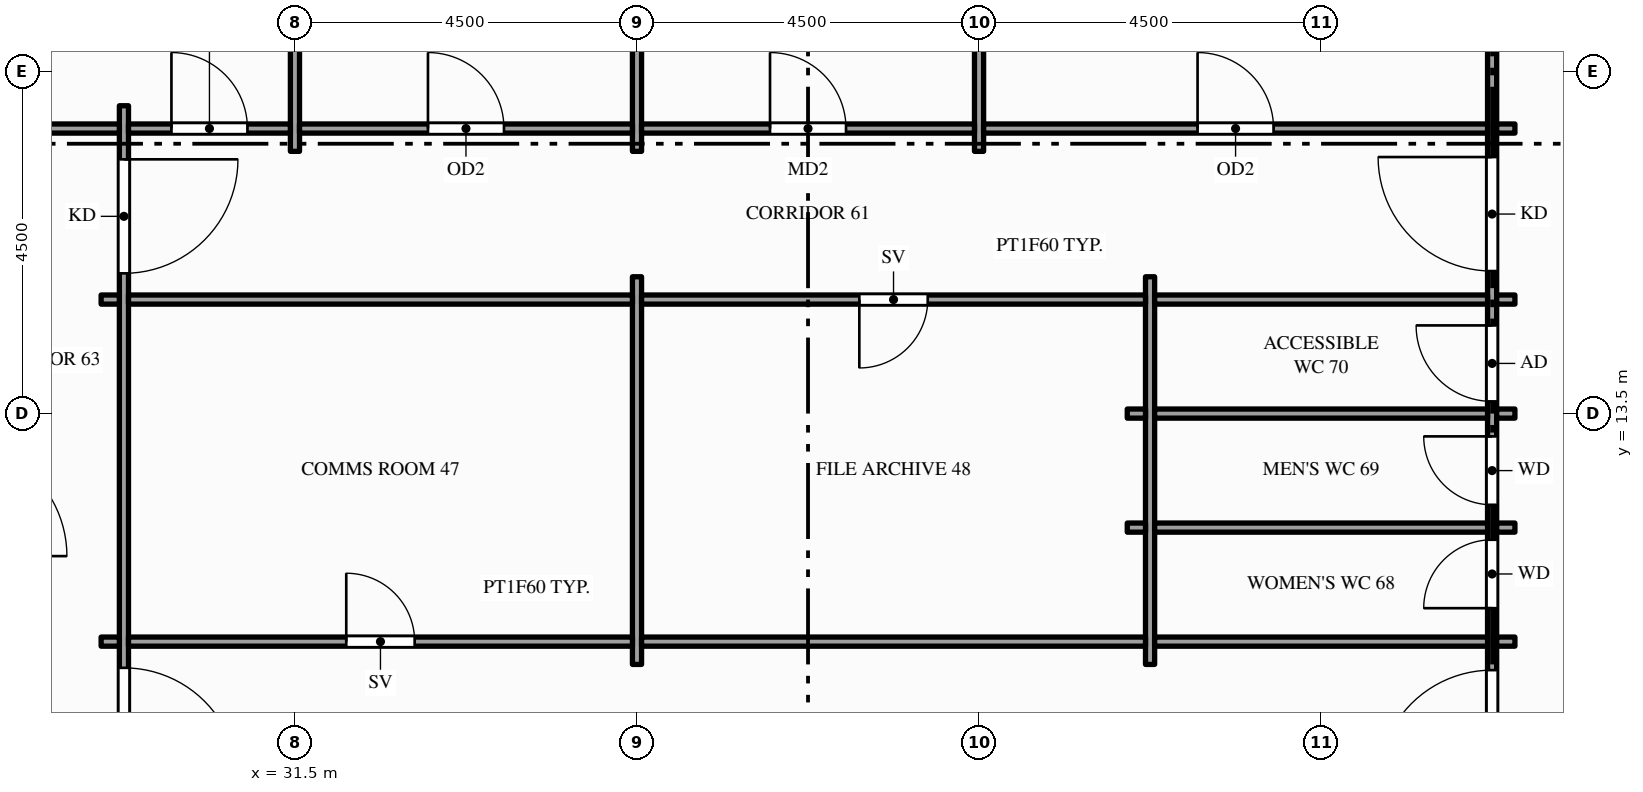
"""IFC4 building model, lengths in metres.
Left out: names, types, materials, properties, quantities, classifications, styles, units other than length and angle.
Written with IfcOpenShell. Run it as: python <this file> out.ifc"""

import sys

from ifc_helpers import new_model, si_unit, direction, frame, frame_2d, origin, place, context, subcontext, project, spatial, rectangle, extrude, element, fill, save


model = new_model("IFC4")
c1 = context("Model", 3, precision=1e-05, world=origin(), true_north=direction((0.0, 1.0)))
c2 = subcontext(c1, "Body", "Model", "MODEL_VIEW")
j1 = project(units=[si_unit("LENGTHUNIT", "METRE"), si_unit("PLANEANGLEUNIT", "RADIAN")], contexts=[c1])
p1 = place(None, origin())
s1 = spatial("IfcSite", under=j1, at=p1, CompositionType="ELEMENT")
p2 = place(p1, origin())
s2 = spatial("IfcBuilding", under=s1, at=p2, CompositionType="ELEMENT")
p3 = place(p2, frame((0.0, 0.0, 171.0)))
s3 = spatial("IfcBuildingStorey", under=s2, at=p3, CompositionType="ELEMENT", Elevation=171.0)
p4 = place(p3, frame((29.25, 7.95, 0.0), z_axis=(0.0, 0.0, 1.0), x_axis=(0.0, 1.0, 0.0)))
e1 = element("IfcWall", 1, at=p4, inside=s3, PredefinedType="PARTITIONING", context=c2, shape_type="SweptSolid", body=[
    extrude(rectangle(XDim=9.6, YDim=0.12, at=frame_2d((4.8, 0.0))), origin(), (0.0, 0.0, 1.0), 2.87),
])
p5 = place(p4, frame((0.705, 0.0, 0.0)))
e2 = element("IfcOpeningElement", 2, at=p5, cuts=e1, PredefinedType="OPENING", context=c2, shape_type="SweptSolid", body=[
    extrude(rectangle(XDim=1.5, YDim=2.1, at=frame_2d((0.75, 1.05))), frame((0.0, 0.07, 0.0), z_axis=(0.0, -1.0, 0.0), x_axis=(1.0, 0.0, 0.0)), (0.0, 0.0, 1.0), 0.14),
])
p6 = place(p4, frame((7.395, 0.0, 0.0)))
e3 = element("IfcOpeningElement", 3, at=p6, cuts=e1, PredefinedType="OPENING", context=c2, shape_type="SweptSolid", body=[
    extrude(rectangle(XDim=1.5, YDim=2.1, at=frame_2d((0.75, 1.05))), frame((0.0, 0.07, 0.0), z_axis=(0.0, -1.0, 0.0), x_axis=(1.0, 0.0, 0.0)), (0.0, 0.0, 1.0), 0.14),
])
p7 = place(p3, frame((31.5, 16.95, 0.0), z_axis=(0.0, 0.0, 1.0), x_axis=(0.0, 1.0, 0.0)))
e4 = element("IfcWall", 4, at=p7, inside=s3, PredefinedType="PARTITIONING", context=c2, shape_type="SweptSolid", body=[
    extrude(rectangle(XDim=6.9, YDim=0.12, at=frame_2d((3.45, 0.0))), origin(), (0.0, 0.0, 1.0), 2.87),
])
p8 = place(p3, frame((36.0, 10.2, 0.0), z_axis=(0.0, 0.0, 1.0), x_axis=(0.0, 1.0, 0.0)))
e5 = element("IfcWall", 5, at=p8, inside=s3, PredefinedType="PARTITIONING", context=c2, shape_type="SweptSolid", body=[
    extrude(rectangle(XDim=5.1, YDim=0.12, at=frame_2d((2.55, 0.0))), origin(), (0.0, 0.0, 1.0), 2.87),
])
for number, where, z_axis, x_axis in (
    (6, (36.0, 16.95, 0.0), (0.0, 0.0, 1.0), (0.0, 1.0, 0.0)),
    (7, (40.5, 16.95, 0.0), (0.0, 0.0, 1.0), (0.0, 1.0, 0.0)),
):
    element("IfcWall", number, at=place(p3, frame(where, z_axis=z_axis, x_axis=x_axis)), inside=s3, PredefinedType="PARTITIONING", context=c2, shape_type="SweptSolid", body=[
        extrude(rectangle(XDim=6.9, YDim=0.12, at=frame_2d((3.45, 0.0))), origin(), (0.0, 0.0, 1.0), 2.87),
    ])
p9 = place(p3, frame((42.75, 10.2, 0.0), z_axis=(0.0, 0.0, 1.0), x_axis=(0.0, 1.0, 0.0)))
e8 = element("IfcWall", 8, at=p9, inside=s3, PredefinedType="PARTITIONING", context=c2, shape_type="SweptSolid", body=[
    extrude(rectangle(XDim=5.1, YDim=0.12, at=frame_2d((2.55, 0.0))), origin(), (0.0, 0.0, 1.0), 2.87),
])
p10 = place(p3, frame((47.25, 1.65, 0.0), z_axis=(0.0, 0.0, 1.0), x_axis=(0.0, 1.0, 0.0)))
e9 = element("IfcWall", 9, at=p10, inside=s3, PredefinedType="PARTITIONING", context=c2, shape_type="SweptSolid", body=[
    extrude(rectangle(XDim=22.2, YDim=0.12, at=frame_2d((11.1, 0.0))), origin(), (0.0, 0.0, 1.0), 2.87),
])
p11 = place(p10, frame((6.975, 0.0, 0.0)))
e10 = element("IfcOpeningElement", 10, at=p11, cuts=e9, PredefinedType="OPENING", context=c2, shape_type="SweptSolid", body=[
    extrude(rectangle(XDim=1.5, YDim=2.1, at=frame_2d((0.75, 1.05))), frame((0.0, 0.07, 0.0), z_axis=(0.0, -1.0, 0.0), x_axis=(1.0, 0.0, 0.0)), (0.0, 0.0, 1.0), 0.14),
])
p12 = place(p10, frame((13.725, 0.0, 0.0)))
e11 = element("IfcOpeningElement", 11, at=p12, cuts=e9, PredefinedType="OPENING", context=c2, shape_type="SweptSolid", body=[
    extrude(rectangle(XDim=1.5, YDim=2.1, at=frame_2d((0.75, 1.05))), frame((0.0, 0.07, 0.0), z_axis=(0.0, -1.0, 0.0), x_axis=(1.0, 0.0, 0.0)), (0.0, 0.0, 1.0), 0.14),
])
p13 = place(p10, frame((9.29, 0.0, 0.0)))
e12 = element("IfcOpeningElement", 12, at=p13, cuts=e9, PredefinedType="OPENING", context=c2, shape_type="SweptSolid", body=[
    extrude(rectangle(XDim=0.9, YDim=2.1, at=frame_2d((0.45, 1.05))), frame((0.0, 0.07, 0.0), z_axis=(0.0, -1.0, 0.0), x_axis=(1.0, 0.0, 0.0)), (0.0, 0.0, 1.0), 0.14),
])
p14 = place(p10, frame((10.65, 0.0, 0.0)))
e13 = element("IfcOpeningElement", 13, at=p14, cuts=e9, PredefinedType="OPENING", context=c2, shape_type="SweptSolid", body=[
    extrude(rectangle(XDim=0.9, YDim=2.1, at=frame_2d((0.45, 1.05))), frame((0.0, 0.07, 0.0), z_axis=(0.0, -1.0, 0.0), x_axis=(1.0, 0.0, 0.0)), (0.0, 0.0, 1.0), 0.14),
])
p15 = place(p10, frame((12.01, 0.0, 0.0)))
e14 = element("IfcOpeningElement", 14, at=p15, cuts=e9, PredefinedType="OPENING", context=c2, shape_type="SweptSolid", body=[
    extrude(rectangle(XDim=1.0, YDim=2.1, at=frame_2d((0.5, 1.05))), frame((0.0, 0.07, 0.0), z_axis=(0.0, -1.0, 0.0), x_axis=(1.0, 0.0, 0.0)), (0.0, 0.0, 1.0), 0.14),
])
p16 = place(p3, frame((28.95, 10.5, 0.0), z_axis=(0.0, 0.0, 1.0), x_axis=(1.0, 0.0, 0.0)))
e15 = element("IfcWall", 15, at=p16, inside=s3, PredefinedType="PARTITIONING", context=c2, shape_type="SweptSolid", body=[
    extrude(rectangle(XDim=0.24, YDim=0.12, at=frame_2d((0.12, 0.0))), origin(), (0.0, 0.0, 1.0), 2.87),
])
p17 = place(p3, frame((29.31, 10.5, 0.0), z_axis=(0.0, 0.0, 1.0), x_axis=(1.0, 0.0, 0.0)))
e16 = element("IfcWall", 16, at=p17, inside=s3, PredefinedType="PARTITIONING", context=c2, shape_type="SweptSolid", body=[
    extrude(rectangle(XDim=6.63, YDim=0.12, at=frame_2d((3.315, 0.0))), origin(), (0.0, 0.0, 1.0), 2.87),
])
p18 = place(p17, frame((2.865, 0.0, 0.0)))
e17 = element("IfcOpeningElement", 17, at=p18, cuts=e16, PredefinedType="OPENING", context=c2, shape_type="SweptSolid", body=[
    extrude(rectangle(XDim=0.9, YDim=2.1, at=frame_2d((0.45, 1.05))), frame((0.0, 0.07, 0.0), z_axis=(0.0, -1.0, 0.0), x_axis=(1.0, 0.0, 0.0)), (0.0, 0.0, 1.0), 0.14),
])
p19 = place(p3, frame((36.06, 10.5, 0.0), z_axis=(0.0, 0.0, 1.0), x_axis=(1.0, 0.0, 0.0)))
e18 = element("IfcWall", 18, at=p19, inside=s3, PredefinedType="PARTITIONING", context=c2, shape_type="SweptSolid", body=[
    extrude(rectangle(XDim=6.63, YDim=0.12, at=frame_2d((3.315, 0.0))), origin(), (0.0, 0.0, 1.0), 2.87),
])
p20 = place(p3, frame((42.81, 10.5, 0.0), z_axis=(0.0, 0.0, 1.0), x_axis=(1.0, 0.0, 0.0)))
e19 = element("IfcWall", 19, at=p20, inside=s3, PredefinedType="PARTITIONING", context=c2, shape_type="SweptSolid", body=[
    extrude(rectangle(XDim=4.38, YDim=0.12, at=frame_2d((2.19, 0.0))), origin(), (0.0, 0.0, 1.0), 2.87),
])
for number, where, z_axis, x_axis in (
    (20, (47.31, 10.5, 0.0), (0.0, 0.0, 1.0), (1.0, 0.0, 0.0)),
    (21, (42.45, 12.0, 0.0), (0.0, 0.0, 1.0), (1.0, 0.0, 0.0)),
):
    element("IfcWall", number, at=place(p3, frame(where, z_axis=z_axis, x_axis=x_axis)), inside=s3, PredefinedType="PARTITIONING", context=c2, shape_type="SweptSolid", body=[
        extrude(rectangle(XDim=0.24, YDim=0.12, at=frame_2d((0.12, 0.0))), origin(), (0.0, 0.0, 1.0), 2.87),
    ])
p21 = place(p3, frame((42.81, 12.0, 0.0), z_axis=(0.0, 0.0, 1.0), x_axis=(1.0, 0.0, 0.0)))
e22 = element("IfcWall", 22, at=p21, inside=s3, PredefinedType="PARTITIONING", context=c2, shape_type="SweptSolid", body=[
    extrude(rectangle(XDim=4.38, YDim=0.12, at=frame_2d((2.19, 0.0))), origin(), (0.0, 0.0, 1.0), 2.87),
])
for number, where, z_axis, x_axis in (
    (23, (47.31, 12.0, 0.0), (0.0, 0.0, 1.0), (1.0, 0.0, 0.0)),
    (24, (42.45, 13.5, 0.0), (0.0, 0.0, 1.0), (1.0, 0.0, 0.0)),
):
    element("IfcWall", number, at=place(p3, frame(where, z_axis=z_axis, x_axis=x_axis)), inside=s3, PredefinedType="PARTITIONING", context=c2, shape_type="SweptSolid", body=[
        extrude(rectangle(XDim=0.24, YDim=0.12, at=frame_2d((0.12, 0.0))), origin(), (0.0, 0.0, 1.0), 2.87),
    ])
p22 = place(p3, frame((42.81, 13.5, 0.0), z_axis=(0.0, 0.0, 1.0), x_axis=(1.0, 0.0, 0.0)))
e25 = element("IfcWall", 25, at=p22, inside=s3, PredefinedType="PARTITIONING", context=c2, shape_type="SweptSolid", body=[
    extrude(rectangle(XDim=4.38, YDim=0.12, at=frame_2d((2.19, 0.0))), origin(), (0.0, 0.0, 1.0), 2.87),
])
for number, where, z_axis, x_axis in (
    (26, (47.31, 13.5, 0.0), (0.0, 0.0, 1.0), (1.0, 0.0, 0.0)),
    (27, (28.95, 15.0, 0.0), (0.0, 0.0, 1.0), (1.0, 0.0, 0.0)),
):
    element("IfcWall", number, at=place(p3, frame(where, z_axis=z_axis, x_axis=x_axis)), inside=s3, PredefinedType="PARTITIONING", context=c2, shape_type="SweptSolid", body=[
        extrude(rectangle(XDim=0.24, YDim=0.12, at=frame_2d((0.12, 0.0))), origin(), (0.0, 0.0, 1.0), 2.87),
    ])
p23 = place(p3, frame((29.31, 15.0, 0.0), z_axis=(0.0, 0.0, 1.0), x_axis=(1.0, 0.0, 0.0)))
e28 = element("IfcWall", 28, at=p23, inside=s3, PredefinedType="PARTITIONING", context=c2, shape_type="SweptSolid", body=[
    extrude(rectangle(XDim=6.63, YDim=0.12, at=frame_2d((3.315, 0.0))), origin(), (0.0, 0.0, 1.0), 2.87),
])
p24 = place(p3, frame((36.06, 15.0, 0.0), z_axis=(0.0, 0.0, 1.0), x_axis=(1.0, 0.0, 0.0)))
e29 = element("IfcWall", 29, at=p24, inside=s3, PredefinedType="PARTITIONING", context=c2, shape_type="SweptSolid", body=[
    extrude(rectangle(XDim=6.63, YDim=0.12, at=frame_2d((3.315, 0.0))), origin(), (0.0, 0.0, 1.0), 2.87),
])
p25 = place(p24, frame((2.865, 0.0, 0.0)))
e30 = element("IfcOpeningElement", 30, at=p25, cuts=e29, PredefinedType="OPENING", context=c2, shape_type="SweptSolid", body=[
    extrude(rectangle(XDim=0.9, YDim=2.1, at=frame_2d((0.45, 1.05))), frame((0.0, 0.07, 0.0), z_axis=(0.0, -1.0, 0.0), x_axis=(1.0, 0.0, 0.0)), (0.0, 0.0, 1.0), 0.14),
])
p26 = place(p3, frame((42.81, 15.0, 0.0), z_axis=(0.0, 0.0, 1.0), x_axis=(1.0, 0.0, 0.0)))
e31 = element("IfcWall", 31, at=p26, inside=s3, PredefinedType="PARTITIONING", context=c2, shape_type="SweptSolid", body=[
    extrude(rectangle(XDim=4.38, YDim=0.12, at=frame_2d((2.19, 0.0))), origin(), (0.0, 0.0, 1.0), 2.87),
])
p27 = place(p3, frame((47.31, 15.0, 0.0), z_axis=(0.0, 0.0, 1.0), x_axis=(1.0, 0.0, 0.0)))
e32 = element("IfcWall", 32, at=p27, inside=s3, PredefinedType="PARTITIONING", context=c2, shape_type="SweptSolid", body=[
    extrude(rectangle(XDim=0.24, YDim=0.12, at=frame_2d((0.12, 0.0))), origin(), (0.0, 0.0, 1.0), 2.87),
])
p28 = place(p3, frame((27.06, 17.25, 0.0), z_axis=(0.0, 0.0, 1.0), x_axis=(1.0, 0.0, 0.0)))
e33 = element("IfcWall", 33, at=p28, inside=s3, PredefinedType="PARTITIONING", context=c2, shape_type="SweptSolid", body=[
    extrude(rectangle(XDim=2.13, YDim=0.12, at=frame_2d((1.065, 0.0))), origin(), (0.0, 0.0, 1.0), 2.87),
])
p29 = place(p3, frame((29.31, 17.25, 0.0), z_axis=(0.0, 0.0, 1.0), x_axis=(1.0, 0.0, 0.0)))
e34 = element("IfcWall", 34, at=p29, inside=s3, PredefinedType="PARTITIONING", context=c2, shape_type="SweptSolid", body=[
    extrude(rectangle(XDim=2.13, YDim=0.12, at=frame_2d((1.065, 0.0))), origin(), (0.0, 0.0, 1.0), 2.87),
])
p30 = place(p29, frame((0.565, 0.0, 0.0)))
e35 = element("IfcOpeningElement", 35, at=p30, cuts=e34, PredefinedType="OPENING", context=c2, shape_type="SweptSolid", body=[
    extrude(rectangle(XDim=1.0, YDim=2.1, at=frame_2d((0.5, 1.05))), frame((0.0, 0.07, 0.0), z_axis=(0.0, -1.0, 0.0), x_axis=(1.0, 0.0, 0.0)), (0.0, 0.0, 1.0), 0.14),
])
p31 = place(p3, frame((31.56, 17.25, 0.0), z_axis=(0.0, 0.0, 1.0), x_axis=(1.0, 0.0, 0.0)))
e36 = element("IfcWall", 36, at=p31, inside=s3, PredefinedType="PARTITIONING", context=c2, shape_type="SweptSolid", body=[
    extrude(rectangle(XDim=4.38, YDim=0.12, at=frame_2d((2.19, 0.0))), origin(), (0.0, 0.0, 1.0), 2.87),
])
p32 = place(p31, frame((1.69, 0.0, 0.0)))
e37 = element("IfcOpeningElement", 37, at=p32, cuts=e36, PredefinedType="OPENING", context=c2, shape_type="SweptSolid", body=[
    extrude(rectangle(XDim=1.0, YDim=2.1, at=frame_2d((0.5, 1.05))), frame((0.0, 0.07, 0.0), z_axis=(0.0, -1.0, 0.0), x_axis=(1.0, 0.0, 0.0)), (0.0, 0.0, 1.0), 0.14),
])
p33 = place(p3, frame((36.06, 17.25, 0.0), z_axis=(0.0, 0.0, 1.0), x_axis=(1.0, 0.0, 0.0)))
e38 = element("IfcWall", 38, at=p33, inside=s3, PredefinedType="PARTITIONING", context=c2, shape_type="SweptSolid", body=[
    extrude(rectangle(XDim=4.38, YDim=0.12, at=frame_2d((2.19, 0.0))), origin(), (0.0, 0.0, 1.0), 2.87),
])
p34 = place(p33, frame((1.69, 0.0, 0.0)))
e39 = element("IfcOpeningElement", 39, at=p34, cuts=e38, PredefinedType="OPENING", context=c2, shape_type="SweptSolid", body=[
    extrude(rectangle(XDim=1.0, YDim=2.1, at=frame_2d((0.5, 1.05))), frame((0.0, 0.07, 0.0), z_axis=(0.0, -1.0, 0.0), x_axis=(1.0, 0.0, 0.0)), (0.0, 0.0, 1.0), 0.14),
])
p35 = place(p3, frame((40.56, 17.25, 0.0), z_axis=(0.0, 0.0, 1.0), x_axis=(1.0, 0.0, 0.0)))
e40 = element("IfcWall", 40, at=p35, inside=s3, PredefinedType="PARTITIONING", context=c2, shape_type="SweptSolid", body=[
    extrude(rectangle(XDim=6.63, YDim=0.12, at=frame_2d((3.315, 0.0))), origin(), (0.0, 0.0, 1.0), 2.87),
])
p36 = place(p35, frame((2.815, 0.0, 0.0)))
e41 = element("IfcOpeningElement", 41, at=p36, cuts=e40, PredefinedType="OPENING", context=c2, shape_type="SweptSolid", body=[
    extrude(rectangle(XDim=1.0, YDim=2.1, at=frame_2d((0.5, 1.05))), frame((0.0, 0.07, 0.0), z_axis=(0.0, -1.0, 0.0), x_axis=(1.0, 0.0, 0.0)), (0.0, 0.0, 1.0), 0.14),
])
p37 = place(p3, frame((47.31, 17.25, 0.0), z_axis=(0.0, 0.0, 1.0), x_axis=(1.0, 0.0, 0.0)))
e42 = element("IfcWall", 42, at=p37, inside=s3, PredefinedType="PARTITIONING", context=c2, shape_type="SweptSolid", body=[
    extrude(rectangle(XDim=0.24, YDim=0.12, at=frame_2d((0.12, 0.0))), origin(), (0.0, 0.0, 1.0), 2.87),
])
p38 = place(p5, origin())
e43 = element("IfcDoor", 43, at=p38, inside=s3, OperationType="SINGLE_SWING_LEFT", PredefinedType="DOOR", context=c2, shape_type="SweptSolid", body=[
    extrude(rectangle(XDim=1.5, YDim=2.1, at=frame_2d((0.75, 1.05))), frame((0.0, 0.025, 0.0), z_axis=(0.0, -1.0, 0.0), x_axis=(1.0, 0.0, 0.0)), (0.0, 0.0, 1.0), 0.05),
])
fill(e2, e43)
p39 = place(p6, origin())
e44 = element("IfcDoor", 44, at=p39, inside=s3, OperationType="SINGLE_SWING_RIGHT", PredefinedType="DOOR", context=c2, shape_type="SweptSolid", body=[
    extrude(rectangle(XDim=1.5, YDim=2.1, at=frame_2d((0.75, 1.05))), frame((0.0, 0.025, 0.0), z_axis=(0.0, -1.0, 0.0), x_axis=(1.0, 0.0, 0.0)), (0.0, 0.0, 1.0), 0.05),
])
fill(e3, e44)
p40 = place(p11, origin())
e45 = element("IfcDoor", 45, at=p40, inside=s3, OperationType="SINGLE_SWING_LEFT", PredefinedType="DOOR", context=c2, shape_type="SweptSolid", body=[
    extrude(rectangle(XDim=1.5, YDim=2.1, at=frame_2d((0.75, 1.05))), frame((0.0, 0.025, 0.0), z_axis=(0.0, -1.0, 0.0), x_axis=(1.0, 0.0, 0.0)), (0.0, 0.0, 1.0), 0.05),
])
fill(e10, e45)
p41 = place(p12, origin())
e46 = element("IfcDoor", 46, at=p41, inside=s3, OperationType="SINGLE_SWING_RIGHT", PredefinedType="DOOR", context=c2, shape_type="SweptSolid", body=[
    extrude(rectangle(XDim=1.5, YDim=2.1, at=frame_2d((0.75, 1.05))), frame((0.0, 0.025, 0.0), z_axis=(0.0, -1.0, 0.0), x_axis=(1.0, 0.0, 0.0)), (0.0, 0.0, 1.0), 0.05),
])
fill(e11, e46)
p42 = place(p18, origin())
e47 = element("IfcDoor", 47, at=p42, inside=s3, OperationType="SINGLE_SWING_LEFT", PredefinedType="DOOR", context=c2, shape_type="SweptSolid", body=[
    extrude(rectangle(XDim=0.9, YDim=2.1, at=frame_2d((0.45, 1.05))), frame((0.0, 0.025, 0.0), z_axis=(0.0, -1.0, 0.0), x_axis=(1.0, 0.0, 0.0)), (0.0, 0.0, 1.0), 0.05),
])
fill(e17, e47)
p43 = place(p25, origin())
e48 = element("IfcDoor", 48, at=p43, inside=s3, OperationType="SINGLE_SWING_LEFT", PredefinedType="DOOR", context=c2, shape_type="SweptSolid", body=[
    extrude(rectangle(XDim=0.9, YDim=2.1, at=frame_2d((0.45, 1.05))), frame((0.0, 0.025, 0.0), z_axis=(0.0, -1.0, 0.0), x_axis=(1.0, 0.0, 0.0)), (0.0, 0.0, 1.0), 0.05),
])
fill(e30, e48)
p44 = place(p13, origin())
e49 = element("IfcDoor", 49, at=p44, inside=s3, OperationType="SINGLE_SWING_LEFT", PredefinedType="DOOR", context=c2, shape_type="SweptSolid", body=[
    extrude(rectangle(XDim=0.9, YDim=2.1, at=frame_2d((0.45, 1.05))), frame((0.0, 0.025, 0.0), z_axis=(0.0, -1.0, 0.0), x_axis=(1.0, 0.0, 0.0)), (0.0, 0.0, 1.0), 0.05),
])
fill(e12, e49)
p45 = place(p14, origin())
e50 = element("IfcDoor", 50, at=p45, inside=s3, OperationType="SINGLE_SWING_RIGHT", PredefinedType="DOOR", context=c2, shape_type="SweptSolid", body=[
    extrude(rectangle(XDim=0.9, YDim=2.1, at=frame_2d((0.45, 1.05))), frame((0.0, 0.025, 0.0), z_axis=(0.0, -1.0, 0.0), x_axis=(1.0, 0.0, 0.0)), (0.0, 0.0, 1.0), 0.05),
])
fill(e13, e50)
p46 = place(p15, origin())
e51 = element("IfcDoor", 51, at=p46, inside=s3, OperationType="SINGLE_SWING_RIGHT", PredefinedType="DOOR", context=c2, shape_type="SweptSolid", body=[
    extrude(rectangle(XDim=1.0, YDim=2.1, at=frame_2d((0.5, 1.05))), frame((0.0, 0.025, 0.0), z_axis=(0.0, -1.0, 0.0), x_axis=(1.0, 0.0, 0.0)), (0.0, 0.0, 1.0), 0.05),
])
fill(e14, e51)
p47 = place(p30, origin())
e52 = element("IfcDoor", 52, at=p47, inside=s3, OperationType="SINGLE_SWING_LEFT", PredefinedType="DOOR", context=c2, shape_type="SweptSolid", body=[
    extrude(rectangle(XDim=1.0, YDim=2.1, at=frame_2d((0.5, 1.05))), frame((0.0, 0.025, 0.0), z_axis=(0.0, -1.0, 0.0), x_axis=(1.0, 0.0, 0.0)), (0.0, 0.0, 1.0), 0.05),
])
fill(e35, e52)
p48 = place(p32, origin())
e53 = element("IfcDoor", 53, at=p48, inside=s3, OperationType="SINGLE_SWING_LEFT", PredefinedType="DOOR", context=c2, shape_type="SweptSolid", body=[
    extrude(rectangle(XDim=1.0, YDim=2.1, at=frame_2d((0.5, 1.05))), frame((0.0, 0.025, 0.0), z_axis=(0.0, -1.0, 0.0), x_axis=(1.0, 0.0, 0.0)), (0.0, 0.0, 1.0), 0.05),
])
fill(e37, e53)
p49 = place(p34, origin())
e54 = element("IfcDoor", 54, at=p49, inside=s3, OperationType="SINGLE_SWING_LEFT", PredefinedType="DOOR", context=c2, shape_type="SweptSolid", body=[
    extrude(rectangle(XDim=1.0, YDim=2.1, at=frame_2d((0.5, 1.05))), frame((0.0, 0.025, 0.0), z_axis=(0.0, -1.0, 0.0), x_axis=(1.0, 0.0, 0.0)), (0.0, 0.0, 1.0), 0.05),
])
fill(e39, e54)
p50 = place(p36, origin())
e55 = element("IfcDoor", 55, at=p50, inside=s3, OperationType="SINGLE_SWING_LEFT", PredefinedType="DOOR", context=c2, shape_type="SweptSolid", body=[
    extrude(rectangle(XDim=1.0, YDim=2.1, at=frame_2d((0.5, 1.05))), frame((0.0, 0.025, 0.0), z_axis=(0.0, -1.0, 0.0), x_axis=(1.0, 0.0, 0.0)), (0.0, 0.0, 1.0), 0.05),
])
fill(e41, e55)
save(model, sys.argv[1])
